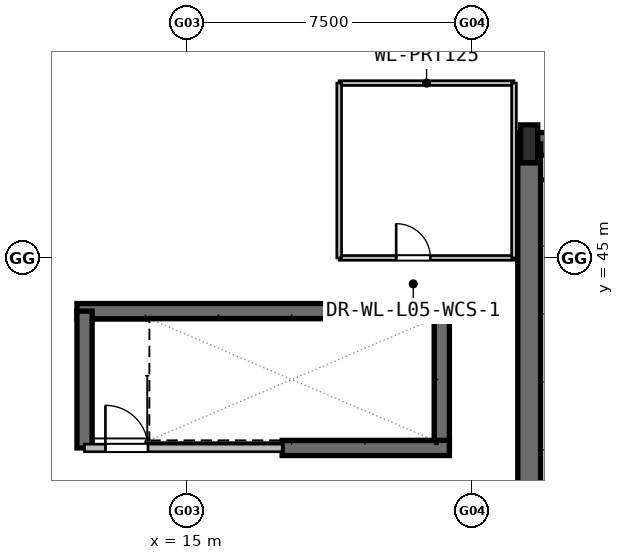
"""IFC4 building model, lengths in metres.
Left out: names, types, materials, properties, quantities, classifications, styles, units other than length and angle.
Written with IfcOpenShell. Run it as: python <this file> out.ifc"""

import sys

from ifc_helpers import new_model, si_unit, direction, frame, frame_2d, origin, origin_2d, place, context, subcontext, project, spatial, rectangle, i_section, extrude, element, fill, save


model = new_model("IFC4")
c1 = context("Model", 3, precision=1e-05, world=origin(), true_north=direction((0.0, 1.0)))
c2 = subcontext(c1, "Body", "Model", "MODEL_VIEW")
j1 = project(units=[si_unit("LENGTHUNIT", "METRE"), si_unit("PLANEANGLEUNIT", "RADIAN")], contexts=[c1])
p1 = place(None, origin())
s1 = spatial("IfcSite", under=j1, at=p1, CompositionType="ELEMENT")
p2 = place(p1, origin())
s2 = spatial("IfcBuilding", under=s1, at=p2, CompositionType="ELEMENT")
p3 = place(p2, frame((0.0, 0.0, 25.2)))
s3 = spatial("IfcBuildingStorey", under=s2, at=p3, CompositionType="ELEMENT", Elevation=25.2)
p4 = place(p3, frame((23.7, 48.0, 0.0), z_axis=(0.0, 0.0, 1.0), x_axis=(1.0, 0.0, 0.0)))
e1 = element("IfcWall", 1, at=p4, inside=s3, PredefinedType="SHEAR", context=c2, shape_type="SweptSolid", body=[
    extrude(rectangle(XDim=27.6, YDim=0.6, at=frame_2d((13.8, 0.0))), origin(), (0.0, 0.0, 1.0), 5.4),
])
p5 = place(p3, frame((24.0, 37.68, 0.0), z_axis=(0.0, 0.0, 1.0), x_axis=(0.0, 1.0, 0.0)))
e2 = element("IfcWall", 2, at=p5, inside=s3, PredefinedType="SHEAR", context=c2, shape_type="SweptSolid", body=[
    extrude(rectangle(XDim=10.32, YDim=0.6, at=frame_2d((5.16, 0.0))), origin(), (0.0, 0.0, 1.0), 5.4),
])
p6 = place(p3, frame((24.0, 48.0, 0.0), z_axis=(0.0, 0.0, 1.0), x_axis=(1.0, 0.0, 0.0)))
e3 = element("IfcColumn", 3, at=p6, inside=s3, PredefinedType="COLUMN", context=c2, shape_type="SweptSolid", body=[
    extrude(i_section(OverallWidth=0.45, OverallDepth=1.0, WebThickness=0.022, FlangeThickness=0.04, at=origin_2d()), origin(), (0.0, 0.0, 1.0), 5.4),
])
p7 = place(p3, frame((12.1, 43.6, 0.0), z_axis=(0.0, 0.0, 1.0), x_axis=(1.0, 0.0, 0.0)))
e4 = element("IfcWall", 4, at=p7, inside=s3, PredefinedType="SHEAR", context=c2, shape_type="SweptSolid", body=[
    extrude(rectangle(XDim=9.8, YDim=0.4, at=frame_2d((4.9, 0.0))), origin(), (0.0, 0.0, 1.0), 5.4),
])
for number, where, z_axis, x_axis in (
    (5, (12.3, 40.0, 0.0), (0.0, 0.0, 1.0), (0.0, 1.0, 0.0)),
    (6, (21.7, 40.0, 0.0), (0.0, 0.0, 1.0), (0.0, 1.0, 0.0)),
):
    element("IfcWall", number, at=place(p3, frame(where, z_axis=z_axis, x_axis=x_axis)), inside=s3, PredefinedType="SHEAR", context=c2, shape_type="SweptSolid", body=[
        extrude(rectangle(XDim=3.6, YDim=0.4, at=frame_2d((1.8, 0.0))), origin(), (0.0, 0.0, 1.0), 5.4),
    ])
p8 = place(p3, frame((17.5, 40.0, 0.0), z_axis=(0.0, 0.0, 1.0), x_axis=(1.0, 0.0, 0.0)))
e7 = element("IfcWall", 7, at=p8, inside=s3, PredefinedType="SHEAR", context=c2, shape_type="SweptSolid", body=[
    extrude(rectangle(XDim=4.4, YDim=0.4, at=frame_2d((2.2, 0.0))), origin(), (0.0, 0.0, 1.0), 5.4),
])
p9 = place(p3, frame((12.3, 40.0, 0.0), z_axis=(0.0, 0.0, 1.0), x_axis=(1.0, 0.0, 0.0)))
e8 = element("IfcWall", 8, at=p9, inside=s3, PredefinedType="PARTITIONING", context=c2, shape_type="SweptSolid", body=[
    extrude(rectangle(XDim=5.2, YDim=0.2, at=frame_2d((2.6, 0.0))), origin(), (0.0, 0.0, 1.0), 5.13),
])
p10 = place(p9, frame((0.55, 0.0, 0.0)))
e9 = element("IfcOpeningElement", 9, at=p10, cuts=e8, PredefinedType="OPENING", context=c2, shape_type="SweptSolid", body=[
    extrude(rectangle(XDim=1.12, YDim=2.1, at=frame_2d((0.56, 1.05))), frame((0.0, 0.11, 0.0), z_axis=(0.0, -1.0, 0.0), x_axis=(1.0, 0.0, 0.0)), (0.0, 0.0, 1.0), 0.22),
])
p11 = place(p3, frame((19.0, 45.0, 0.0), z_axis=(0.0, 0.0, 1.0), x_axis=(1.0, 0.0, 0.0)))
e10 = element("IfcWall", 10, at=p11, inside=s3, PredefinedType="PARTITIONING", context=c2, shape_type="SweptSolid", body=[
    extrude(rectangle(XDim=4.6, YDim=0.125, at=frame_2d((2.3, 0.0))), origin(), (0.0, 0.0, 1.0), 5.13),
])
p12 = place(p11, frame((1.5, 0.0, 0.0)))
e11 = element("IfcOpeningElement", 11, at=p12, cuts=e10, PredefinedType="OPENING", context=c2, shape_type="SweptSolid", body=[
    extrude(rectangle(XDim=0.9, YDim=2.05, at=frame_2d((0.45, 1.025))), frame((0.0, 0.073, 0.0), z_axis=(0.0, -1.0, 0.0), x_axis=(1.0, 0.0, 0.0)), (0.0, 0.0, 1.0), 0.145),
])
p13 = place(p3, frame((19.0, 49.6, 0.0), z_axis=(0.0, 0.0, 1.0), x_axis=(1.0, 0.0, 0.0)))
e12 = element("IfcWall", 12, at=p13, inside=s3, PredefinedType="PARTITIONING", context=c2, shape_type="SweptSolid", body=[
    extrude(rectangle(XDim=4.6, YDim=0.125, at=frame_2d((2.3, 0.0))), origin(), (0.0, 0.0, 1.0), 5.13),
])
for number, where, z_axis, x_axis in (
    (13, (19.0, 45.0, 0.0), (0.0, 0.0, 1.0), (0.0, 1.0, 0.0)),
    (14, (23.6, 45.0, 0.0), (0.0, 0.0, 1.0), (0.0, 1.0, 0.0)),
):
    element("IfcWall", number, at=place(p3, frame(where, z_axis=z_axis, x_axis=x_axis)), inside=s3, PredefinedType="PARTITIONING", context=c2, shape_type="SweptSolid", body=[
        extrude(rectangle(XDim=4.6, YDim=0.125, at=frame_2d((2.3, 0.0))), origin(), (0.0, 0.0, 1.0), 2.63),
    ])
p14 = place(p10, origin())
e15 = element("IfcDoor", 15, at=p14, inside=s3, OperationType="SINGLE_SWING_LEFT", PredefinedType="DOOR", context=c2, shape_type="SweptSolid", body=[
    extrude(rectangle(XDim=1.12, YDim=2.1, at=frame_2d((0.56, 1.05))), frame((0.0, 0.025, 0.0), z_axis=(0.0, -1.0, 0.0), x_axis=(1.0, 0.0, 0.0)), (0.0, 0.0, 1.0), 0.05),
])
fill(e9, e15)
p15 = place(p12, origin())
e16 = element("IfcDoor", 16, at=p15, inside=s3, OperationType="SINGLE_SWING_RIGHT", PredefinedType="DOOR", context=c2, shape_type="SweptSolid", body=[
    extrude(rectangle(XDim=0.9, YDim=2.05, at=frame_2d((0.45, 1.025))), frame((0.0, 0.025, 0.0), z_axis=(0.0, -1.0, 0.0), x_axis=(1.0, 0.0, 0.0)), (0.0, 0.0, 1.0), 0.05),
])
fill(e11, e16)
save(model, sys.argv[1])
